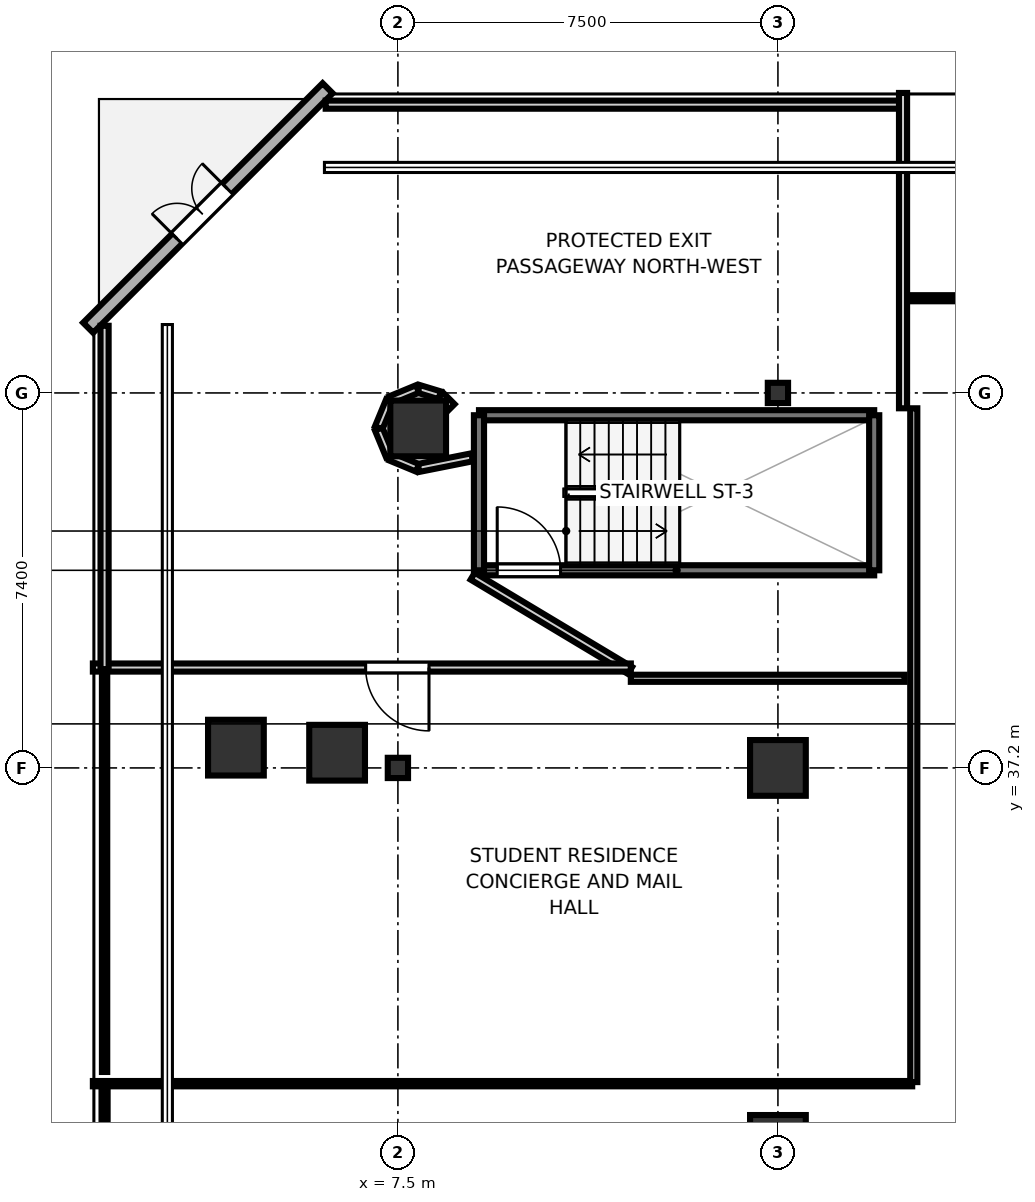
"""IFC4 building model, lengths in metres.
Left out: names, types, materials, properties, quantities, classifications, styles, units other than length and angle.
Written with IfcOpenShell. Run it as: python <this file> out.ifc"""

import sys

from ifc_helpers import new_model, si_unit, direction, frame, frame_2d, origin, origin_2d, place, context, subcontext, project, spatial, rectangle, i_section, extrude, element, fill, save


model = new_model("IFC4")
c1 = context("Model", 3, precision=1e-05, world=origin(), true_north=direction((0.0, 1.0)))
c2 = subcontext(c1, "Body", "Model", "MODEL_VIEW")
j1 = project(units=[si_unit("LENGTHUNIT", "METRE"), si_unit("PLANEANGLEUNIT", "RADIAN")], contexts=[c1])
p1 = place(None, origin())
s1 = spatial("IfcSite", under=j1, at=p1, CompositionType="ELEMENT")
p2 = place(p1, origin())
s2 = spatial("IfcBuilding", under=s1, at=p2, CompositionType="ELEMENT")
p3 = place(p2, origin())
s3 = spatial("IfcBuildingStorey", under=s2, at=p3, CompositionType="ELEMENT", Elevation=0.0)
for number, where, z_axis, x_axis in (
    (1, (7.9, 43.9, 0.0), (0.0, 0.0, 1.0), (1.0, 0.0, 0.0)),
    (2, (6.3, 37.5, 0.0), (0.0, 0.0, 1.0), (1.0, 0.0, 0.0)),
):
    element("IfcColumn", number, at=place(p3, frame(where, z_axis=z_axis, x_axis=x_axis)), inside=s3, PredefinedType="COLUMN", context=c2, shape_type="SweptSolid", body=[
        extrude(rectangle(XDim=1.1, YDim=1.1, at=origin_2d()), origin(), (0.0, 0.0, 1.0), 6.0),
    ])
p4 = place(p3, frame((7.5, 37.2, 0.0), z_axis=(0.0, 0.0, 1.0), x_axis=(1.0, 0.0, 0.0)))
e3 = element("IfcColumn", 3, at=p4, inside=s3, PredefinedType="COLUMN", context=c2, shape_type="SweptSolid", body=[
    extrude(i_section(OverallWidth=0.4, OverallDepth=0.4, WebThickness=0.013, FlangeThickness=0.021, at=origin_2d()), origin(), (0.0, 0.0, 1.0), 6.0),
])
for number, where, z_axis, x_axis in (
    (4, (15.0, 29.8, 0.0), (0.0, 0.0, 1.0), (1.0, 0.0, 0.0)),
    (5, (15.0, 37.2, 0.0), (0.0, 0.0, 1.0), (1.0, 0.0, 0.0)),
):
    element("IfcColumn", number, at=place(p3, frame(where, z_axis=z_axis, x_axis=x_axis)), inside=s3, PredefinedType="COLUMN", context=c2, shape_type="SweptSolid", body=[
        extrude(rectangle(XDim=1.1, YDim=1.1, at=origin_2d()), origin(), (0.0, 0.0, 1.0), 6.0),
    ])
p5 = place(p3, frame((15.0, 44.6, 0.0), z_axis=(0.0, 0.0, 1.0), x_axis=(1.0, 0.0, 0.0)))
e6 = element("IfcColumn", 6, at=p5, inside=s3, PredefinedType="COLUMN", context=c2, shape_type="SweptSolid", body=[
    extrude(i_section(OverallWidth=0.4, OverallDepth=0.4, WebThickness=0.013, FlangeThickness=0.021, at=origin_2d()), origin(), (0.0, 0.0, 1.0), 6.0),
])
p6 = place(p3, frame((4.303, 37.6, 0.0), z_axis=(0.0, 0.0, 1.0), x_axis=(1.0, 0.0, 0.0)))
e7 = element("IfcColumn", 7, at=p6, inside=s3, PredefinedType="COLUMN", context=c2, shape_type="SweptSolid", body=[
    extrude(rectangle(XDim=1.1, YDim=1.1, at=origin_2d()), origin(), (0.0, 0.0, 1.0), 6.0),
])
p7 = place(p3, frame((1.387, 45.887, 0.0), z_axis=(0.0, 0.0, 1.0), x_axis=(0.707106781187, 0.707106781187, 0.0)))
e8 = element("IfcWall", 8, at=p7, inside=s3, PredefinedType="SOLIDWALL", context=c2, shape_type="SweptSolid", body=[
    extrude(rectangle(XDim=6.684, YDim=0.28, at=frame_2d((3.342, 0.0))), origin(), (0.0, 0.0, 1.0), 5.78),
])
p8 = place(p7, frame((2.482, 0.0, 0.0)))
e9 = element("IfcOpeningElement", 9, at=p8, cuts=e8, PredefinedType="OPENING", context=c2, shape_type="SweptSolid", body=[
    extrude(rectangle(XDim=1.4, YDim=2.2, at=frame_2d((0.7, 1.1))), frame((0.0, 0.15, 0.0), z_axis=(0.0, -1.0, 0.0), x_axis=(1.0, 0.0, 0.0)), (0.0, 0.0, 1.0), 0.3),
])
p9 = place(p3, frame((9.1, 41.1, 0.0), z_axis=(0.0, 0.0, 1.0), x_axis=(1.0, 0.0, 0.0)))
e10 = element("IfcWall", 10, at=p9, inside=s3, PredefinedType="SOLIDWALL", context=c2, shape_type="SweptSolid", body=[
    extrude(rectangle(XDim=7.8, YDim=0.2, at=frame_2d((3.9, 0.0))), origin(), (0.0, 0.0, 1.0), 5.78),
])
p10 = place(p9, frame((0.36, 0.0, 0.0)))
e11 = element("IfcOpeningElement", 11, at=p10, cuts=e10, PredefinedType="OPENING", context=c2, shape_type="SweptSolid", body=[
    extrude(rectangle(XDim=1.25, YDim=2.15, at=frame_2d((0.625, 1.075))), frame((0.0, 0.11, 0.0), z_axis=(0.0, -1.0, 0.0), x_axis=(1.0, 0.0, 0.0)), (0.0, 0.0, 1.0), 0.22),
])
p11 = place(p3, frame((9.1, 44.16, 0.0), z_axis=(0.0, 0.0, 1.0), x_axis=(1.0, 0.0, 0.0)))
e12 = element("IfcWall", 12, at=p11, inside=s3, PredefinedType="SOLIDWALL", context=c2, shape_type="SweptSolid", body=[
    extrude(rectangle(XDim=7.8, YDim=0.2, at=frame_2d((3.9, 0.0))), origin(), (0.0, 0.0, 1.0), 5.78),
])
for number, where, z_axis, x_axis in (
    (13, (9.1, 41.1, 0.0), (0.0, 0.0, 1.0), (0.0, 1.0, 0.0)),
    (14, (16.9, 41.1, 0.0), (0.0, 0.0, 1.0), (0.0, 1.0, 0.0)),
):
    element("IfcWall", number, at=place(p3, frame(where, z_axis=z_axis, x_axis=x_axis)), inside=s3, PredefinedType="SOLIDWALL", context=c2, shape_type="SweptSolid", body=[
        extrude(rectangle(XDim=3.06, YDim=0.2, at=frame_2d((1.53, 0.0))), origin(), (0.0, 0.0, 1.0), 5.78),
    ])
p12 = place(p3, frame((7.906, 43.12, 0.0), z_axis=(0.0, 0.0, 1.0), x_axis=(0.980814552351, 0.194943104256, 0.0)))
e15 = element("IfcWall", 15, at=p12, inside=s3, PredefinedType="PARTITIONING", context=c2, shape_type="SweptSolid", body=[
    extrude(rectangle(XDim=1.081, YDim=0.16, at=frame_2d((0.541, 0.0))), origin(), (0.0, 0.0, 1.0), 5.1),
])
p13 = place(p3, frame((8.976, 40.985, 0.0), z_axis=(0.0, 0.0, 1.0), x_axis=(0.857713004506, -0.514128779492, 0.0)))
e16 = element("IfcWall", 16, at=p13, inside=s3, PredefinedType="PARTITIONING", context=c2, shape_type="SweptSolid", body=[
    extrude(rectangle(XDim=3.62, YDim=0.16, at=frame_2d((1.81, 0.0))), origin(), (0.0, 0.0, 1.0), 5.1),
])
p14 = place(p3, frame((12.097, 39.181, 0.0), z_axis=(0.0, 0.0, 1.0), x_axis=(-1.0, 0.0, 0.0)))
e17 = element("IfcWall", 17, at=p14, inside=s3, PredefinedType="PARTITIONING", context=c2, shape_type="SweptSolid", body=[
    extrude(rectangle(XDim=10.617, YDim=0.16, at=frame_2d((5.309, 0.0))), origin(), (0.0, 0.0, 1.0), 5.1),
])
p15 = place(p14, frame((3.983, 0.0, 0.0)))
e18 = element("IfcOpeningElement", 18, at=p15, cuts=e17, PredefinedType="OPENING", context=c2, shape_type="SweptSolid", body=[
    extrude(rectangle(XDim=1.25, YDim=2.2, at=frame_2d((0.625, 1.1))), frame((0.0, 0.09, 0.0), z_axis=(0.0, -1.0, 0.0), x_axis=(1.0, 0.0, 0.0)), (0.0, 0.0, 1.0), 0.18),
])
p16 = place(p3, frame((1.711, 39.15, 0.0), z_axis=(0.0, 0.0, 1.0), x_axis=(0.0, 1.0, 0.0)))
e19 = element("IfcWall", 19, at=p16, inside=s3, PredefinedType="PARTITIONING", context=c2, shape_type="SweptSolid", body=[
    extrude(rectangle(XDim=6.775, YDim=0.16, at=frame_2d((3.388, 0.0))), origin(), (0.0, 0.0, 1.0), 5.1),
])
p17 = place(p3, frame((6.075, 50.289, 0.0), z_axis=(0.0, 0.0, 1.0), x_axis=(1.0, 0.0, 0.0)))
e20 = element("IfcWall", 20, at=p17, inside=s3, PredefinedType="PARTITIONING", context=c2, shape_type="SweptSolid", body=[
    extrude(rectangle(XDim=11.425, YDim=0.16, at=frame_2d((5.713, 0.0))), origin(), (0.0, 0.0, 1.0), 5.1),
])
p18 = place(p3, frame((17.469, 50.52, 0.0), z_axis=(0.0, 0.0, 1.0), x_axis=(0.0, -1.0, 0.0)))
e21 = element("IfcWall", 21, at=p18, inside=s3, PredefinedType="PARTITIONING", context=c2, shape_type="SweptSolid", body=[
    extrude(rectangle(XDim=6.223, YDim=0.16, at=frame_2d((3.111, 0.0))), origin(), (0.0, 0.0, 1.0), 5.1),
])
p19 = place(p3, frame((8.562, 44.322, 0.0), z_axis=(0.0, 0.0, 1.0), x_axis=(-0.707106781187, 0.707106781187, 0.0)))
e22 = element("IfcWall", 22, at=p19, inside=s3, PredefinedType="PARTITIONING", context=c2, shape_type="SweptSolid", body=[
    extrude(rectangle(XDim=0.316, YDim=0.16, at=frame_2d((0.158, 0.0))), origin(), (0.0, 0.0, 1.0), 5.1),
])
p20 = place(p3, frame((8.326, 44.553, 0.0), z_axis=(0.0, 0.0, 1.0), x_axis=(-0.956911178217, 0.29038077933, 0.0)))
e23 = element("IfcWall", 23, at=p20, inside=s3, PredefinedType="PARTITIONING", context=c2, shape_type="SweptSolid", body=[
    extrude(rectangle(XDim=0.436, YDim=0.16, at=frame_2d((0.218, 0.0))), origin(), (0.0, 0.0, 1.0), 5.1),
])
for number, where, z_axis, x_axis in (
    (24, (7.888, 44.679, 0.0), (0.0, 0.0, 1.0), (-0.924, -0.383, 0.0)),
    (25, (7.341, 44.442, 0.0), (0.0, 0.0, 1.0), (-0.383, -0.924, 0.0)),
    (26, (7.121, 43.888, 0.0), (0.0, 0.0, 1.0), (0.383, -0.924, 0.0)),
    (27, (7.358, 43.341, 0.0), (0.0, 0.0, 1.0), (0.924, -0.383, 0.0)),
):
    element("IfcWall", number, at=place(p3, frame(where, z_axis=z_axis, x_axis=x_axis)), inside=s3, PredefinedType="PARTITIONING", context=c2, shape_type="SweptSolid", body=[
        extrude(rectangle(XDim=0.574, YDim=0.16, at=frame_2d((0.287, 0.0))), origin(), (0.0, 0.0, 1.0), 5.1),
    ])
p21 = place(p3, frame((1.711, 21.0, 0.0), z_axis=(0.0, 0.0, 1.0), x_axis=(0.0, 1.0, 0.0)))
e28 = element("IfcWall", 28, at=p21, inside=s3, PredefinedType="PARTITIONING", context=c2, shape_type="SweptSolid", body=[
    extrude(rectangle(XDim=10.0, YDim=0.12, at=frame_2d((5.0, 0.0))), origin(), (0.0, 0.0, 1.0), 5.1),
])
p22 = place(p3, frame((1.48, 30.969, 0.0), z_axis=(0.0, 0.0, 1.0), x_axis=(1.0, 0.0, 0.0)))
e29 = element("IfcWall", 29, at=p22, inside=s3, PredefinedType="PARTITIONING", context=c2, shape_type="SweptSolid", body=[
    extrude(rectangle(XDim=16.17, YDim=0.105, at=frame_2d((8.085, 0.0))), origin(), (0.0, 0.0, 1.0), 5.1),
])
p23 = place(p3, frame((17.681, 31.0, 0.0), z_axis=(0.0, 0.0, 1.0), x_axis=(0.0, 1.0, 0.0)))
e30 = element("IfcWall", 30, at=p23, inside=s3, PredefinedType="PARTITIONING", context=c2, shape_type="SweptSolid", body=[
    extrude(rectangle(XDim=13.297, YDim=0.14, at=frame_2d((6.648, 0.0))), origin(), (0.0, 0.0, 1.0), 5.1),
])
p24 = place(p3, frame((17.65, 46.469, 0.0), z_axis=(0.0, 0.0, 1.0), x_axis=(1.0, 0.0, 0.0)))
e31 = element("IfcWall", 31, at=p24, inside=s3, PredefinedType="PARTITIONING", context=c2, shape_type="SweptSolid", body=[
    extrude(rectangle(XDim=11.75, YDim=0.12, at=frame_2d((5.875, 0.0))), origin(), (0.0, 0.0, 1.0), 5.1),
])
p25 = place(p3, frame((1.711, 31.2, 0.0), z_axis=(0.0, 0.0, 1.0), x_axis=(0.0, 1.0, 0.0)))
e32 = element("IfcWall", 32, at=p25, inside=s3, PredefinedType="PARTITIONING", context=c2, shape_type="SweptSolid", body=[
    extrude(rectangle(XDim=7.8, YDim=0.105, at=frame_2d((3.9, 0.0))), origin(), (0.0, 0.0, 1.0), 5.1),
])
p26 = place(p3, frame((12.097, 38.969, 0.0), z_axis=(0.0, 0.0, 1.0), x_axis=(1.0, 0.0, 0.0)))
e33 = element("IfcWall", 33, at=p26, inside=s3, PredefinedType="PARTITIONING", context=c2, shape_type="SweptSolid", body=[
    extrude(rectangle(XDim=5.403, YDim=0.14, at=frame_2d((2.702, 0.0))), origin(), (0.0, 0.0, 1.0), 5.1),
])
p27 = place(p8, origin())
e34 = element("IfcDoor", 34, at=p27, inside=s3, OperationType="DOUBLE_DOOR_SINGLE_SWING", PredefinedType="DOOR", context=c2, shape_type="SweptSolid", body=[
    extrude(rectangle(XDim=1.4, YDim=2.2, at=frame_2d((0.7, 1.1))), frame((0.0, 0.025, 0.0), z_axis=(0.0, -1.0, 0.0), x_axis=(1.0, 0.0, 0.0)), (0.0, 0.0, 1.0), 0.05),
])
fill(e9, e34)
p28 = place(p10, origin())
e35 = element("IfcDoor", 35, at=p28, inside=s3, OperationType="SINGLE_SWING_LEFT", PredefinedType="DOOR", context=c2, shape_type="SweptSolid", body=[
    extrude(rectangle(XDim=1.25, YDim=2.15, at=frame_2d((0.625, 1.075))), frame((0.0, 0.025, 0.0), z_axis=(0.0, -1.0, 0.0), x_axis=(1.0, 0.0, 0.0)), (0.0, 0.0, 1.0), 0.05),
])
fill(e11, e35)
p29 = place(p15, origin())
e36 = element("IfcDoor", 36, at=p29, inside=s3, OperationType="SINGLE_SWING_LEFT", PredefinedType="DOOR", context=c2, shape_type="SweptSolid", body=[
    extrude(rectangle(XDim=1.25, YDim=2.2, at=frame_2d((0.625, 1.1))), frame((0.0, 0.025, 0.0), z_axis=(0.0, -1.0, 0.0), x_axis=(1.0, 0.0, 0.0)), (0.0, 0.0, 1.0), 0.05),
])
fill(e18, e36)
save(model, sys.argv[1])
